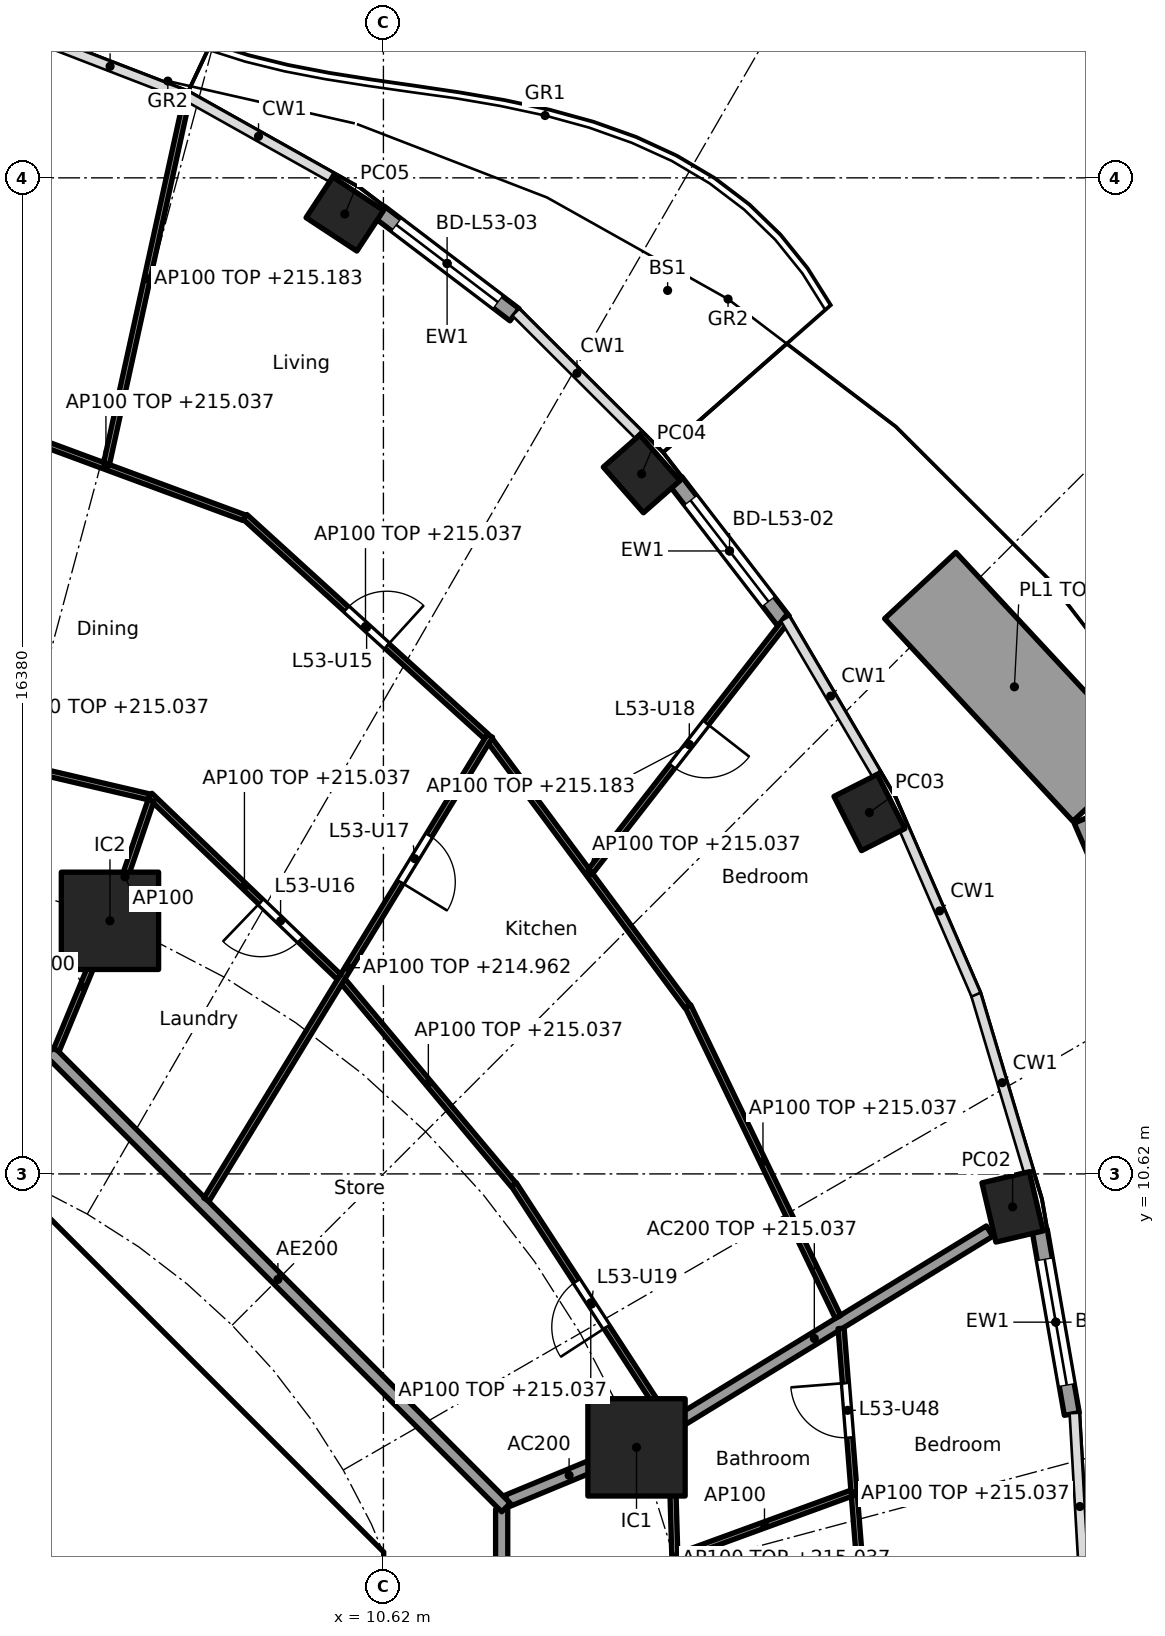
"""IFC4 building model, lengths in metres.
Left out: names, types, materials, properties, quantities, classifications, styles, units other than length and angle.
Written with IfcOpenShell. Run it as: python <this file> out.ifc"""

import sys

from ifc_helpers import new_model, si_unit, direction, frame, frame_2d, origin, origin_2d, place, context, subcontext, project, spatial, polyline, rectangle, hollow_rectangle, outline, extrude, element, fill, save


model = new_model("IFC4")
c1 = context("Model", 3, precision=1e-05, world=origin(), true_north=direction((0.0, 1.0)))
c2 = subcontext(c1, "Body", "Model", "MODEL_VIEW")
j1 = project(units=[si_unit("LENGTHUNIT", "METRE"), si_unit("PLANEANGLEUNIT", "RADIAN")], contexts=[c1])
p1 = place(None, origin())
s1 = spatial("IfcSite", under=j1, at=p1, CompositionType="ELEMENT")
p2 = place(p1, origin())
s2 = spatial("IfcBuilding", under=s1, at=p2, CompositionType="ELEMENT")
p3 = place(p2, frame((0.0, 0.0, 212.2)))
s3 = spatial("IfcBuildingStorey", under=s2, at=p3, CompositionType="ELEMENT", Elevation=212.2)
for number, where, z_axis, x_axis in (
    (1, (20.967, 10.077, -0.26), (0.0, 0.0, 1.0), (-0.229, 0.973, 0.0)),
    (2, (18.612, 16.563, -0.26), (0.0, 0.0, 1.0), (-0.452, 0.892, 0.0)),
    (3, (14.866, 22.132, -0.26), (0.0, 0.0, 1.0), (-0.66, 0.751, 0.0)),
    (4, (9.985, 26.405, -0.26), (0.0, 0.0, 1.0), (-0.836, 0.549, 0.0)),
):
    element("IfcColumn", number, at=place(p3, frame(where, z_axis=z_axis, x_axis=x_axis)), inside=s3, PredefinedType="COLUMN", context=c2, shape_type="SweptSolid", body=[
        extrude(hollow_rectangle(XDim=1.0, YDim=0.8, WallThickness=0.032, at=origin_2d()), origin(), (0.0, 0.0, 1.0), 3.96),
    ])
for number, where, z_axis, x_axis in (
    (5, (14.782, 6.123, 0.0), (0.0, 0.0, 1.0), (1.0, 0.0, 0.0)),
    (6, (6.123, 14.782, 0.0), (0.0, 0.0, 1.0), (1.0, 0.0, 0.0)),
):
    element("IfcColumn", number, at=place(p3, frame(where, z_axis=z_axis, x_axis=x_axis)), inside=s3, PredefinedType="COLUMN", context=c2, shape_type="SweptSolid", body=[
        extrude(rectangle(XDim=1.6, YDim=1.6, at=origin_2d()), origin(), (0.0, 0.0, 1.0), 3.7),
    ])
p4 = place(p3, frame((21.413, 9.693, 0.0), z_axis=(0.0, 0.0, 1.0), x_axis=(0.172177583768, -0.985065926549, 0.0)))
e7 = element("IfcWall", 7, at=p4, inside=s3, PredefinedType="SOLIDWALL", context=c2, shape_type="SweptSolid", body=[
    extrude(rectangle(XDim=3.067, YDim=0.25, at=frame_2d((1.534, 0.0))), origin(), (0.0, 0.0, 1.0), 3.44),
])
p5 = place(p4, frame((0.484, 0.0, 0.0)))
e8 = element("IfcOpeningElement", 8, at=p5, cuts=e7, PredefinedType="OPENING", context=c2, shape_type="SweptSolid", body=[
    extrude(rectangle(XDim=2.1, YDim=2.4, at=frame_2d((1.05, 1.2))), frame((0.0, 0.135, 0.0), z_axis=(0.0, -1.0, 0.0), x_axis=(1.0, 0.0, 0.0)), (0.0, 0.0, 1.0), 0.27),
])
p6 = place(p3, frame((15.426, 22.013, 0.0), z_axis=(0.0, 0.0, 1.0), x_axis=(0.610438565676, -0.792063607001, 0.0)))
e9 = element("IfcWall", 9, at=p6, inside=s3, PredefinedType="SOLIDWALL", context=c2, shape_type="SweptSolid", body=[
    extrude(rectangle(XDim=2.901, YDim=0.25, at=frame_2d((1.45, 0.0))), origin(), (0.0, 0.0, 1.0), 3.44),
])
p7 = place(p6, frame((0.4, 0.0, 0.0)))
e10 = element("IfcOpeningElement", 10, at=p7, cuts=e9, PredefinedType="OPENING", context=c2, shape_type="SweptSolid", body=[
    extrude(rectangle(XDim=2.1, YDim=2.4, at=frame_2d((1.05, 1.2))), frame((0.0, 0.135, 0.0), z_axis=(0.0, -1.0, 0.0), x_axis=(1.0, 0.0, 0.0)), (0.0, 0.0, 1.0), 0.27),
])
p8 = place(p3, frame((10.557, 26.436, 0.0), z_axis=(0.0, 0.0, 1.0), x_axis=(0.796022158395, -0.605267480825, 0.0)))
e11 = element("IfcWall", 11, at=p8, inside=s3, PredefinedType="SOLIDWALL", context=c2, shape_type="SweptSolid", body=[
    extrude(rectangle(XDim=2.789, YDim=0.25, at=frame_2d((1.395, 0.0))), origin(), (0.0, 0.0, 1.0), 3.44),
])
p9 = place(p8, frame((0.344, 0.0, 0.0)))
e12 = element("IfcOpeningElement", 12, at=p9, cuts=e11, PredefinedType="OPENING", context=c2, shape_type="SweptSolid", body=[
    extrude(rectangle(XDim=2.1, YDim=2.4, at=frame_2d((1.05, 1.2))), frame((0.0, 0.135, 0.0), z_axis=(0.0, -1.0, 0.0), x_axis=(1.0, 0.0, 0.0)), (0.0, 0.0, 1.0), 0.27),
])
p10 = place(p3, frame((19.448, 20.296, 0.0), z_axis=(0.0, 0.0, 1.0), x_axis=(0.680759878288, -0.732506647147, 0.0)))
e13 = element("IfcWall", 13, at=p10, inside=s3, PredefinedType="SOLIDWALL", context=c2, shape_type="SweptSolid", body=[
    extrude(rectangle(XDim=4.548, YDim=1.6, at=frame_2d((2.274, 0.0))), origin(), (0.0, 0.0, 1.0), 1.1),
])
p11 = place(p3, frame((22.714, 16.705, 0.0), z_axis=(0.0, 0.0, 1.0), x_axis=(0.397501798616, -0.917601394995, 0.0)))
e14 = element("IfcWall", 14, at=p11, inside=s3, PredefinedType="SOLIDWALL", context=c2, shape_type="SweptSolid", body=[
    extrude(rectangle(XDim=10.248, YDim=1.6, at=frame_2d((5.124, 0.0))), origin(), (0.0, 0.0, 1.0), 1.1),
])
p12 = place(p3, frame((9.988, 4.613, 0.0), z_axis=(0.0, 0.0, 1.0), x_axis=(-0.707106781187, 0.707106781187, 0.0)))
e15 = element("IfcWall", 15, at=p12, inside=s3, PredefinedType="SHEAR", context=c2, shape_type="SweptSolid", body=[
    extrude(rectangle(XDim=7.602, YDim=0.6, at=frame_2d((3.801, 0.0))), origin(), (0.0, 0.0, 1.0), 3.44),
])
p13 = place(p12, frame((3.201, 0.0, 0.0)))
e16 = element("IfcOpeningElement", 16, at=p13, cuts=e15, PredefinedType="OPENING", context=c2, shape_type="SweptSolid", body=[
    extrude(rectangle(XDim=1.2, YDim=2.1, at=frame_2d((0.6, 1.05))), frame((0.0, 0.31, 0.0), z_axis=(0.0, -1.0, 0.0), x_axis=(1.0, 0.0, 0.0)), (0.0, 0.0, 1.0), 0.62),
])
p14 = place(p3, origin())
e17 = element("IfcWall", 17, at=p14, inside=s3, PredefinedType="SHEAR", context=c2, shape_type="SweptSolid", body=[
    extrude(outline(polyline([(9.776, -4.401), (10.025, -4.152), (10.025, -3.801), (10.025, 4.152), (9.776, 4.401), (10.2, 4.825), (10.625, 4.401), (10.625, -4.401), (10.2, -4.825), (9.776, -4.401)])), origin(), (0.0, 0.0, 1.0), 3.44),
])
p15 = place(p3, frame((12.657, 5.243, 0.0), z_axis=(0.0, 0.0, 1.0), x_axis=(0.92383017907, 0.382802560388, 0.0)))
e18 = element("IfcWall", 18, at=p15, inside=s3, PredefinedType="PARTITIONING", context=c2, shape_type="SweptSolid", body=[
    extrude(rectangle(XDim=2.2, YDim=0.2, at=frame_2d((1.1, 0.0))), origin(), (0.0, 0.0, 1.0), 3.44),
])
p16 = place(p3, frame((14.825, 6.149, 0.0), z_axis=(0.0, 0.0, 1.0), x_axis=(0.852781365284, 0.522268075824, 0.0)))
e19 = element("IfcWall", 19, at=p16, inside=s3, PredefinedType="PARTITIONING", context=c2, shape_type="SweptSolid", body=[
    extrude(rectangle(XDim=6.758, YDim=0.2, at=frame_2d((3.379, 0.0))), origin(), (0.0, 0.0, 1.0), 2.837),
])
p17 = place(p3, frame((12.565, -5.104, 0.0), z_axis=(0.0, 0.0, 1.0), x_axis=(0.0, 1.0, 0.0)))
e20 = element("IfcWall", 20, at=p17, inside=s3, PredefinedType="PARTITIONING", context=c2, shape_type="SweptSolid", body=[
    extrude(rectangle(XDim=10.209, YDim=0.2, at=frame_2d((5.104, 0.0))), origin(), (0.0, 0.0, 1.0), 3.44),
])
p18 = place(p17, frame((4.604, 0.0, 0.0)))
e21 = element("IfcOpeningElement", 21, at=p18, cuts=e20, PredefinedType="OPENING", context=c2, shape_type="SweptSolid", body=[
    extrude(rectangle(XDim=1.0, YDim=2.1, at=frame_2d((0.5, 1.05))), frame((0.0, 0.11, 0.0), z_axis=(0.0, -1.0, 0.0), x_axis=(1.0, 0.0, 0.0)), (0.0, 0.0, 1.0), 0.22),
])
p19 = place(p3, frame((12.635, 5.134, 0.0), z_axis=(0.0, 0.0, 1.0), x_axis=(-0.707106781187, 0.707106781187, 0.0)))
e22 = element("IfcWall", 22, at=p19, inside=s3, PredefinedType="PARTITIONING", context=c2, shape_type="SweptSolid", body=[
    extrude(rectangle(XDim=10.609, YDim=0.2, at=frame_2d((5.305, 0.0))), origin(), (0.0, 0.0, 1.0), 3.44),
])
p20 = place(p3, frame((15.475, 2.2, 0.0), z_axis=(0.0, 0.0, 1.0), x_axis=(-0.029254623973, 0.999571991893, 0.0)))
e23 = element("IfcWall", 23, at=p20, inside=s3, PredefinedType="PARTITIONING", context=c2, shape_type="SweptSolid", body=[
    extrude(rectangle(XDim=4.173, YDim=0.1, at=frame_2d((2.086, 0.0))), origin(), (0.0, 0.0, 1.0), 2.837),
])
p21 = place(p3, frame((18.578, 2.642, 0.0), z_axis=(0.0, 0.0, 1.0), x_axis=(-0.079188322924, 0.996859673932, 0.0)))
e24 = element("IfcWall", 24, at=p21, inside=s3, PredefinedType="PARTITIONING", context=c2, shape_type="SweptSolid", body=[
    extrude(rectangle(XDim=5.454, YDim=0.1, at=frame_2d((2.727, 0.0))), origin(), (0.0, 0.0, 1.0), 2.837),
])
p22 = place(p21, frame((3.653, 0.0, 0.0)))
e25 = element("IfcOpeningElement", 25, at=p22, cuts=e24, PredefinedType="OPENING", context=c2, shape_type="SweptSolid", body=[
    extrude(rectangle(XDim=0.9, YDim=2.1, at=frame_2d((0.45, 1.05))), frame((0.0, 0.06, 0.0), z_axis=(0.0, -1.0, 0.0), x_axis=(1.0, 0.0, 0.0)), (0.0, 0.0, 1.0), 0.12),
])
p23 = place(p3, frame((15.46, 4.327, 0.0), z_axis=(0.0, 0.0, 1.0), x_axis=(0.939452643938, 0.342678755977, 0.0)))
e26 = element("IfcWall", 26, at=p23, inside=s3, PredefinedType="PARTITIONING", context=c2, shape_type="SweptSolid", body=[
    extrude(rectangle(XDim=3.037, YDim=0.1, at=frame_2d((1.519, 0.0))), origin(), (0.0, 0.0, 1.0), 3.44),
])
p24 = place(p3, frame((15.295, 6.554, 0.0), z_axis=(0.0, 0.0, 1.0), x_axis=(-0.545186120363, 0.838315032767, 0.0)))
e27 = element("IfcWall", 27, at=p24, inside=s3, PredefinedType="PARTITIONING", context=c2, shape_type="SweptSolid", body=[
    extrude(rectangle(XDim=4.643, YDim=0.1, at=frame_2d((2.321, 0.0))), origin(), (0.0, 0.0, 1.0), 2.837),
])
p25 = place(p24, frame((1.846, 0.0, 0.0)))
e28 = element("IfcOpeningElement", 28, at=p25, cuts=e27, PredefinedType="OPENING", context=c2, shape_type="SweptSolid", body=[
    extrude(rectangle(XDim=0.9, YDim=2.1, at=frame_2d((0.45, 1.05))), frame((0.0, 0.06, 0.0), z_axis=(0.0, -1.0, 0.0), x_axis=(1.0, 0.0, 0.0)), (0.0, 0.0, 1.0), 0.12),
])
p26 = place(p3, frame((18.095, 8.269, 0.0), z_axis=(0.0, 0.0, 1.0), x_axis=(-0.434640773561, 0.900603907363, 0.0)))
e29 = element("IfcWall", 29, at=p26, inside=s3, PredefinedType="PARTITIONING", context=c2, shape_type="SweptSolid", body=[
    extrude(rectangle(XDim=5.674, YDim=0.1, at=frame_2d((2.837, 0.0))), origin(), (0.0, 0.0, 1.0), 2.837),
])
p27 = place(p3, frame((12.759, 10.443, 0.0), z_axis=(0.0, 0.0, 1.0), x_axis=(-0.642225196965, 0.766516011825, 0.0)))
e30 = element("IfcWall", 30, at=p27, inside=s3, PredefinedType="PARTITIONING", context=c2, shape_type="SweptSolid", body=[
    extrude(rectangle(XDim=4.361, YDim=0.1, at=frame_2d((2.18, 0.0))), origin(), (0.0, 0.0, 1.0), 2.837),
])
p28 = place(p3, frame((15.621, 13.374, 0.0), z_axis=(0.0, 0.0, 1.0), x_axis=(-0.596174489482, 0.8028548923, 0.0)))
e31 = element("IfcWall", 31, at=p28, inside=s3, PredefinedType="PARTITIONING", context=c2, shape_type="SweptSolid", body=[
    extrude(rectangle(XDim=5.442, YDim=0.1, at=frame_2d((2.721, 0.0))), origin(), (0.0, 0.0, 1.0), 2.837),
])
p29 = place(p3, frame((14.029, 15.598, 0.0), z_axis=(0.0, 0.0, 1.0), x_axis=(0.614558710688, 0.788871086501, 0.0)))
e32 = element("IfcWall", 32, at=p29, inside=s3, PredefinedType="PARTITIONING", context=c2, shape_type="SweptSolid", body=[
    extrude(rectangle(XDim=5.276, YDim=0.1, at=frame_2d((2.638, 0.0))), origin(), (0.0, 0.0, 1.0), 2.983),
])
p30 = place(p29, frame((2.188, 0.0, 0.0)))
e33 = element("IfcOpeningElement", 33, at=p30, cuts=e32, PredefinedType="OPENING", context=c2, shape_type="SweptSolid", body=[
    extrude(rectangle(XDim=0.9, YDim=2.1, at=frame_2d((0.45, 1.05))), frame((0.0, 0.06, 0.0), z_axis=(0.0, -1.0, 0.0), x_axis=(1.0, 0.0, 0.0)), (0.0, 0.0, 1.0), 0.12),
])
p31 = place(p3, frame((7.71, 10.197, 0.0), z_axis=(0.0, 0.0, 1.0), x_axis=(0.521477621335, 0.853264959111, 0.0)))
e34 = element("IfcWall", 34, at=p31, inside=s3, PredefinedType="PARTITIONING", context=c2, shape_type="SweptSolid", body=[
    extrude(rectangle(XDim=8.941, YDim=0.1, at=frame_2d((4.471, 0.0))), origin(), (0.0, 0.0, 1.0), 2.762),
])
p32 = place(p31, frame((6.121, 0.0, 0.0)))
e35 = element("IfcOpeningElement", 35, at=p32, cuts=e34, PredefinedType="OPENING", context=c2, shape_type="SweptSolid", body=[
    extrude(rectangle(XDim=0.9, YDim=2.1, at=frame_2d((0.45, 1.05))), frame((0.0, 0.06, 0.0), z_axis=(0.0, -1.0, 0.0), x_axis=(1.0, 0.0, 0.0)), (0.0, 0.0, 1.0), 0.12),
])
p33 = place(p3, frame((9.89, 13.858, 0.0), z_axis=(0.0, 0.0, 1.0), x_axis=(-0.72167233993, 0.692234811159, 0.0)))
e36 = element("IfcWall", 36, at=p33, inside=s3, PredefinedType="PARTITIONING", context=c2, shape_type="SweptSolid", body=[
    extrude(rectangle(XDim=4.313, YDim=0.1, at=frame_2d((2.156, 0.0))), origin(), (0.0, 0.0, 1.0), 2.837),
])
p34 = place(p33, frame((0.883, 0.0, 0.0)))
e37 = element("IfcOpeningElement", 37, at=p34, cuts=e36, PredefinedType="OPENING", context=c2, shape_type="SweptSolid", body=[
    extrude(rectangle(XDim=0.9, YDim=2.1, at=frame_2d((0.45, 1.05))), frame((0.0, 0.06, 0.0), z_axis=(0.0, -1.0, 0.0), x_axis=(1.0, 0.0, 0.0)), (0.0, 0.0, 1.0), 0.12),
])
p35 = place(p3, frame((12.31, 17.817, 0.0), z_axis=(0.0, 0.0, 1.0), x_axis=(-0.739697052892, 0.672940019573, 0.0)))
e38 = element("IfcWall", 38, at=p35, inside=s3, PredefinedType="PARTITIONING", context=c2, shape_type="SweptSolid", body=[
    extrude(rectangle(XDim=5.365, YDim=0.1, at=frame_2d((2.683, 0.0))), origin(), (0.0, 0.0, 1.0), 2.837),
])
p36 = place(p35, frame((2.208, 0.0, 0.0)))
e39 = element("IfcOpeningElement", 39, at=p36, cuts=e38, PredefinedType="OPENING", context=c2, shape_type="SweptSolid", body=[
    extrude(rectangle(XDim=0.9, YDim=2.1, at=frame_2d((0.45, 1.05))), frame((0.0, 0.06, 0.0), z_axis=(0.0, -1.0, 0.0), x_axis=(1.0, 0.0, 0.0)), (0.0, 0.0, 1.0), 0.12),
])
p37 = place(p3, frame((5.243, 12.657, 0.0), z_axis=(0.0, 0.0, 1.0), x_axis=(0.382719158442, 0.923864733477, 0.0)))
e40 = element("IfcWall", 40, at=p37, inside=s3, PredefinedType="PARTITIONING", context=c2, shape_type="SweptSolid", body=[
    extrude(rectangle(XDim=2.25, YDim=0.1, at=frame_2d((1.125, 0.0))), origin(), (0.0, 0.0, 1.0), 3.44),
])
p38 = place(p3, frame((6.139, 14.829, 0.0), z_axis=(0.0, 0.0, 1.0), x_axis=(0.32278593828, 0.946471995385, 0.0)))
e41 = element("IfcWall", 41, at=p38, inside=s3, PredefinedType="PARTITIONING", context=c2, shape_type="SweptSolid", body=[
    extrude(rectangle(XDim=2.042, YDim=0.1, at=frame_2d((1.021, 0.0))), origin(), (0.0, 0.0, 1.0), 3.44),
])
p39 = place(p3, frame((6.766, 16.82, 0.0), z_axis=(0.0, 0.0, 1.0), x_axis=(-0.973612608559, 0.22820711745, 0.0)))
e42 = element("IfcWall", 42, at=p39, inside=s3, PredefinedType="PARTITIONING", context=c2, shape_type="SweptSolid", body=[
    extrude(rectangle(XDim=3.663, YDim=0.1, at=frame_2d((1.832, 0.0))), origin(), (0.0, 0.0, 1.0), 2.837),
])
p40 = place(p3, frame((8.331, 21.411, 0.0), z_axis=(0.0, 0.0, 1.0), x_axis=(-0.937891982431, 0.346927412136, 0.0)))
e43 = element("IfcWall", 43, at=p40, inside=s3, PredefinedType="PARTITIONING", context=c2, shape_type="SweptSolid", body=[
    extrude(rectangle(XDim=4.85, YDim=0.1, at=frame_2d((2.425, 0.0))), origin(), (0.0, 0.0, 1.0), 2.837),
])
p41 = place(p3, frame((6.067, 22.301, 0.0), z_axis=(0.0, 0.0, 1.0), x_axis=(0.214401821533, 0.976745544614, 0.0)))
e44 = element("IfcWall", 44, at=p41, inside=s3, PredefinedType="PARTITIONING", context=c2, shape_type="SweptSolid", body=[
    extrude(rectangle(XDim=6.228, YDim=0.1, at=frame_2d((3.114, 0.0))), origin(), (0.0, 0.0, 1.0), 2.983),
])
p42 = place(p5, origin())
e45 = element("IfcDoor", 45, at=p42, inside=s3, OperationType="SLIDING_TO_LEFT", PredefinedType="DOOR", context=c2, shape_type="SweptSolid", body=[
    extrude(rectangle(XDim=2.1, YDim=2.4, at=frame_2d((1.05, 1.2))), frame((0.0, 0.025, 0.0), z_axis=(0.0, -1.0, 0.0), x_axis=(1.0, 0.0, 0.0)), (0.0, 0.0, 1.0), 0.05),
])
fill(e8, e45)
p43 = place(p7, origin())
e46 = element("IfcDoor", 46, at=p43, inside=s3, OperationType="SLIDING_TO_LEFT", PredefinedType="DOOR", context=c2, shape_type="SweptSolid", body=[
    extrude(rectangle(XDim=2.1, YDim=2.4, at=frame_2d((1.05, 1.2))), frame((0.0, 0.025, 0.0), z_axis=(0.0, -1.0, 0.0), x_axis=(1.0, 0.0, 0.0)), (0.0, 0.0, 1.0), 0.05),
])
fill(e10, e46)
p44 = place(p9, origin())
e47 = element("IfcDoor", 47, at=p44, inside=s3, OperationType="SLIDING_TO_LEFT", PredefinedType="DOOR", context=c2, shape_type="SweptSolid", body=[
    extrude(rectangle(XDim=2.1, YDim=2.4, at=frame_2d((1.05, 1.2))), frame((0.0, 0.025, 0.0), z_axis=(0.0, -1.0, 0.0), x_axis=(1.0, 0.0, 0.0)), (0.0, 0.0, 1.0), 0.05),
])
fill(e12, e47)
p45 = place(p13, origin())
e48 = element("IfcDoor", 48, at=p45, inside=s3, OperationType="SINGLE_SWING_LEFT", PredefinedType="DOOR", context=c2, shape_type="SweptSolid", body=[
    extrude(rectangle(XDim=1.2, YDim=2.1, at=frame_2d((0.6, 1.05))), frame((0.0, 0.025, 0.0), z_axis=(0.0, -1.0, 0.0), x_axis=(1.0, 0.0, 0.0)), (0.0, 0.0, 1.0), 0.05),
])
fill(e16, e48)
p46 = place(p36, frame((0.9, 0.0, 0.0), x_axis=(-1.0, 0.0, 0.0)))
e49 = element("IfcDoor", 49, at=p46, inside=s3, OperationType="SINGLE_SWING_RIGHT", PredefinedType="DOOR", context=c2, shape_type="SweptSolid", body=[
    extrude(rectangle(XDim=0.9, YDim=2.1, at=frame_2d((0.45, 1.05))), frame((0.0, 0.025, 0.0), z_axis=(0.0, -1.0, 0.0), x_axis=(1.0, 0.0, 0.0)), (0.0, 0.0, 1.0), 0.05),
])
fill(e39, e49)
p47 = place(p34, origin())
e50 = element("IfcDoor", 50, at=p47, inside=s3, OperationType="SINGLE_SWING_RIGHT", PredefinedType="DOOR", context=c2, shape_type="SweptSolid", body=[
    extrude(rectangle(XDim=0.9, YDim=2.1, at=frame_2d((0.45, 1.05))), frame((0.0, 0.025, 0.0), z_axis=(0.0, -1.0, 0.0), x_axis=(1.0, 0.0, 0.0)), (0.0, 0.0, 1.0), 0.05),
])
fill(e37, e50)
p48 = place(p32, frame((0.9, 0.0, 0.0), x_axis=(-1.0, 0.0, 0.0)))
e51 = element("IfcDoor", 51, at=p48, inside=s3, OperationType="SINGLE_SWING_RIGHT", PredefinedType="DOOR", context=c2, shape_type="SweptSolid", body=[
    extrude(rectangle(XDim=0.9, YDim=2.1, at=frame_2d((0.45, 1.05))), frame((0.0, 0.025, 0.0), z_axis=(0.0, -1.0, 0.0), x_axis=(1.0, 0.0, 0.0)), (0.0, 0.0, 1.0), 0.05),
])
fill(e35, e51)
p49 = place(p30, frame((0.9, 0.0, 0.0), x_axis=(-1.0, 0.0, 0.0)))
e52 = element("IfcDoor", 52, at=p49, inside=s3, OperationType="SINGLE_SWING_LEFT", PredefinedType="DOOR", context=c2, shape_type="SweptSolid", body=[
    extrude(rectangle(XDim=0.9, YDim=2.1, at=frame_2d((0.45, 1.05))), frame((0.0, 0.025, 0.0), z_axis=(0.0, -1.0, 0.0), x_axis=(1.0, 0.0, 0.0)), (0.0, 0.0, 1.0), 0.05),
])
fill(e33, e52)
p50 = place(p25, origin())
e53 = element("IfcDoor", 53, at=p50, inside=s3, OperationType="SINGLE_SWING_LEFT", PredefinedType="DOOR", context=c2, shape_type="SweptSolid", body=[
    extrude(rectangle(XDim=0.9, YDim=2.1, at=frame_2d((0.45, 1.05))), frame((0.0, 0.025, 0.0), z_axis=(0.0, -1.0, 0.0), x_axis=(1.0, 0.0, 0.0)), (0.0, 0.0, 1.0), 0.05),
])
fill(e28, e53)
p51 = place(p22, origin())
e54 = element("IfcDoor", 54, at=p51, inside=s3, OperationType="SINGLE_SWING_RIGHT", PredefinedType="DOOR", context=c2, shape_type="SweptSolid", body=[
    extrude(rectangle(XDim=0.9, YDim=2.1, at=frame_2d((0.45, 1.05))), frame((0.0, 0.025, 0.0), z_axis=(0.0, -1.0, 0.0), x_axis=(1.0, 0.0, 0.0)), (0.0, 0.0, 1.0), 0.05),
])
fill(e25, e54)
save(model, sys.argv[1])
